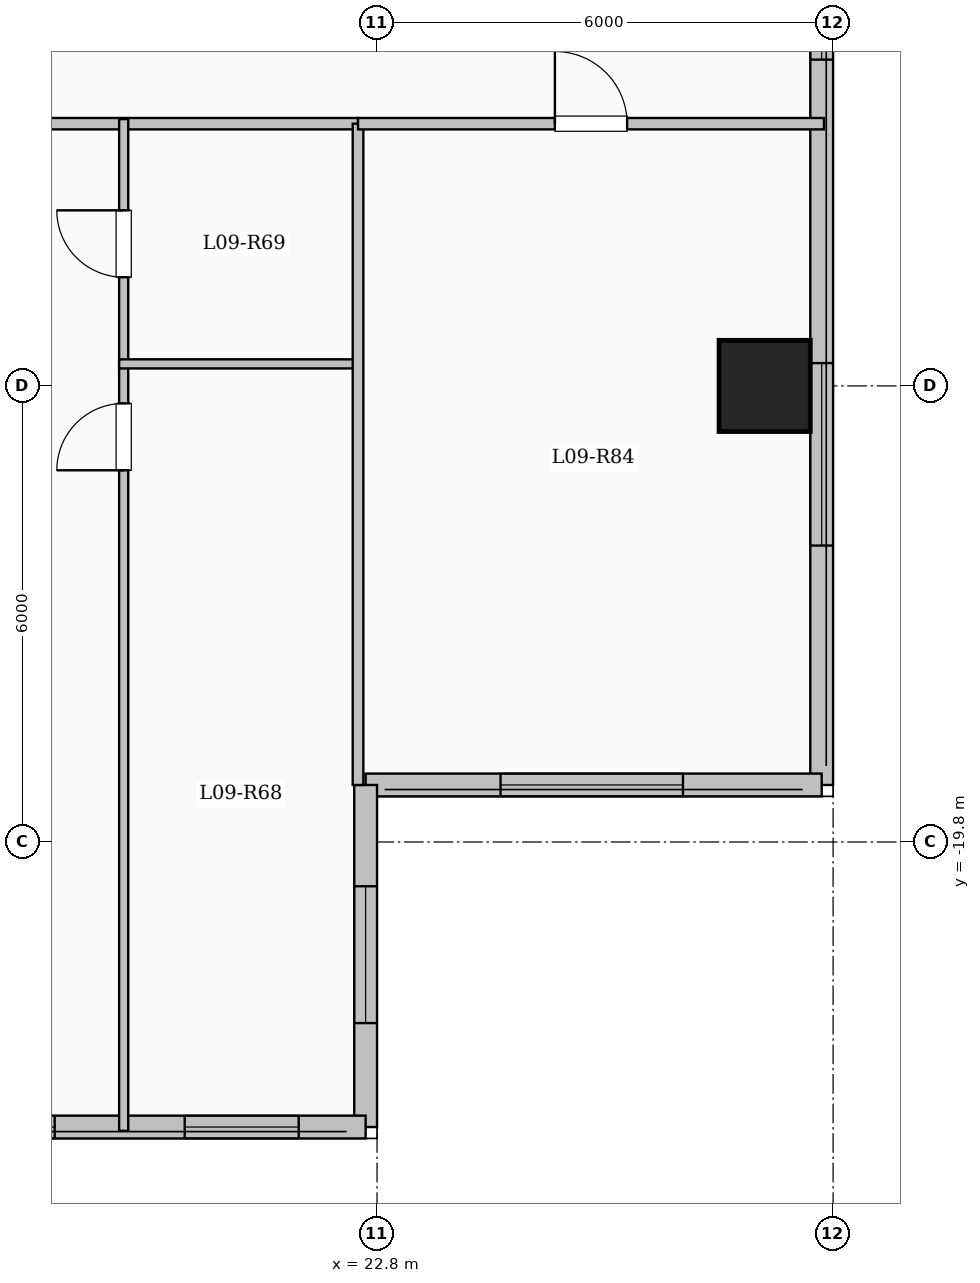
"""IFC4 building model, lengths in metres.
Left out: names, types, materials, properties, quantities, classifications, styles, units other than length and angle.
Written with IfcOpenShell. Run it as: python <this file> out.ifc"""

import sys

from ifc_helpers import new_model, si_unit, direction, frame, frame_2d, origin, origin_2d, place, context, subcontext, project, spatial, rectangle, extrude, element, fill, save


model = new_model("IFC4")
c1 = context("Model", 3, precision=1e-05, world=origin(), true_north=direction((0.0, 1.0)))
c2 = subcontext(c1, "Body", "Model", "MODEL_VIEW")
j1 = project(units=[si_unit("LENGTHUNIT", "METRE"), si_unit("PLANEANGLEUNIT", "RADIAN")], contexts=[c1])
p1 = place(None, origin())
s1 = spatial("IfcSite", under=j1, at=p1, CompositionType="ELEMENT")
p2 = place(p1, origin())
s2 = spatial("IfcBuilding", under=s1, at=p2, CompositionType="ELEMENT")
p3 = place(p2, frame((0.0, 0.0, 37.4)))
s3 = spatial("IfcBuildingStorey", under=s2, at=p3, CompositionType="ELEMENT", Elevation=37.4)
p4 = place(p3, frame((27.9, -13.8, 0.0), z_axis=(0.0, 0.0, 1.0), x_axis=(1.0, 0.0, 0.0)))
e1 = element("IfcColumn", 1, at=p4, inside=s3, PredefinedType="COLUMN", context=c2, shape_type="SweptSolid", body=[
    extrude(rectangle(XDim=1.2, YDim=1.2, at=origin_2d()), origin(), (0.0, 0.0, 1.0), 3.35),
])
p5 = place(p3, frame((28.65, 19.05, 0.0), z_axis=(0.0, 0.0, 1.0), x_axis=(0.0, -1.0, 0.0)))
e2 = element("IfcWall", 2, at=p5, inside=s3, PredefinedType="SOLIDWALL", context=c2, shape_type="SweptSolid", body=[
    extrude(rectangle(XDim=38.1, YDim=0.3, at=frame_2d((19.05, 0.0))), origin(), (0.0, 0.0, 1.0), 3.1),
])
p6 = place(p5, frame((2.275, 0.0, 0.9)))
e3 = element("IfcOpeningElement", 3, at=p6, cuts=e2, PredefinedType="OPENING", context=c2, shape_type="SweptSolid", body=[
    extrude(rectangle(XDim=2.0, YDim=1.7, at=frame_2d((1.0, 0.85))), frame((0.0, 0.16, 0.0), z_axis=(0.0, -1.0, 0.0), x_axis=(1.0, 0.0, 0.0)), (0.0, 0.0, 1.0), 0.32),
])
p7 = place(p5, frame((6.925, 0.0, 0.95)))
e4 = element("IfcOpeningElement", 4, at=p7, cuts=e2, PredefinedType="OPENING", context=c2, shape_type="SweptSolid", body=[
    extrude(rectangle(XDim=1.0, YDim=1.5, at=frame_2d((0.5, 0.75))), frame((0.0, 0.16, 0.0), z_axis=(0.0, -1.0, 0.0), x_axis=(1.0, 0.0, 0.0)), (0.0, 0.0, 1.0), 0.32),
])
p8 = place(p5, frame((16.3, 0.0, 0.9)))
e5 = element("IfcOpeningElement", 5, at=p8, cuts=e2, PredefinedType="OPENING", context=c2, shape_type="SweptSolid", body=[
    extrude(rectangle(XDim=2.0, YDim=1.7, at=frame_2d((1.0, 0.85))), frame((0.0, 0.16, 0.0), z_axis=(0.0, -1.0, 0.0), x_axis=(1.0, 0.0, 0.0)), (0.0, 0.0, 1.0), 0.32),
])
p9 = place(p5, frame((27.058, 0.0, 0.9)))
e6 = element("IfcOpeningElement", 6, at=p9, cuts=e2, PredefinedType="OPENING", context=c2, shape_type="SweptSolid", body=[
    extrude(rectangle(XDim=1.5, YDim=1.65, at=frame_2d((0.75, 0.825))), frame((0.0, 0.16, 0.0), z_axis=(0.0, -1.0, 0.0), x_axis=(1.0, 0.0, 0.0)), (0.0, 0.0, 1.0), 0.32),
])
p10 = place(p5, frame((32.55, 0.0, 0.9)))
e7 = element("IfcOpeningElement", 7, at=p10, cuts=e2, PredefinedType="OPENING", context=c2, shape_type="SweptSolid", body=[
    extrude(rectangle(XDim=2.4, YDim=1.8, at=frame_2d((1.2, 0.9))), frame((0.0, 0.16, 0.0), z_axis=(0.0, -1.0, 0.0), x_axis=(1.0, 0.0, 0.0)), (0.0, 0.0, 1.0), 0.32),
])
p11 = place(p3, frame((28.65, -19.05, 0.0), z_axis=(0.0, 0.0, 1.0), x_axis=(-1.0, 0.0, 0.0)))
e8 = element("IfcWall", 8, at=p11, inside=s3, PredefinedType="SOLIDWALL", context=c2, shape_type="SweptSolid", body=[
    extrude(rectangle(XDim=6.0, YDim=0.3, at=frame_2d((3.0, 0.0))), origin(), (0.0, 0.0, 1.0), 3.1),
])
p12 = place(p11, frame((1.825, 0.0, 0.9)))
e9 = element("IfcOpeningElement", 9, at=p12, cuts=e8, PredefinedType="OPENING", context=c2, shape_type="SweptSolid", body=[
    extrude(rectangle(XDim=2.4, YDim=1.8, at=frame_2d((1.2, 0.9))), frame((0.0, 0.16, 0.0), z_axis=(0.0, -1.0, 0.0), x_axis=(1.0, 0.0, 0.0)), (0.0, 0.0, 1.0), 0.32),
])
p13 = place(p3, frame((22.65, -19.05, 0.0), z_axis=(0.0, 0.0, 1.0), x_axis=(0.0, -1.0, 0.0)))
e10 = element("IfcWall", 10, at=p13, inside=s3, PredefinedType="SOLIDWALL", context=c2, shape_type="SweptSolid", body=[
    extrude(rectangle(XDim=4.5, YDim=0.3, at=frame_2d((2.25, 0.0))), origin(), (0.0, 0.0, 1.0), 3.1),
])
p14 = place(p13, frame((1.333, 0.0, 0.9)))
e11 = element("IfcOpeningElement", 11, at=p14, cuts=e10, PredefinedType="OPENING", context=c2, shape_type="SweptSolid", body=[
    extrude(rectangle(XDim=1.8, YDim=1.65, at=frame_2d((0.9, 0.825))), frame((0.0, 0.16, 0.0), z_axis=(0.0, -1.0, 0.0), x_axis=(1.0, 0.0, 0.0)), (0.0, 0.0, 1.0), 0.32),
])
p15 = place(p3, frame((22.65, -23.55, 0.0), z_axis=(0.0, 0.0, 1.0), x_axis=(-1.0, 0.0, 0.0)))
e12 = element("IfcWall", 12, at=p15, inside=s3, PredefinedType="SOLIDWALL", context=c2, shape_type="SweptSolid", body=[
    extrude(rectangle(XDim=15.3, YDim=0.3, at=frame_2d((7.65, 0.0))), origin(), (0.0, 0.0, 1.0), 3.1),
])
p16 = place(p15, frame((0.88, 0.0, 0.9)))
e13 = element("IfcOpeningElement", 13, at=p16, cuts=e12, PredefinedType="OPENING", context=c2, shape_type="SweptSolid", body=[
    extrude(rectangle(XDim=1.5, YDim=1.65, at=frame_2d((0.75, 0.825))), frame((0.0, 0.16, 0.0), z_axis=(0.0, -1.0, 0.0), x_axis=(1.0, 0.0, 0.0)), (0.0, 0.0, 1.0), 0.32),
])
p17 = place(p15, frame((4.091, 0.0, 0.9)))
e14 = element("IfcOpeningElement", 14, at=p17, cuts=e12, PredefinedType="OPENING", context=c2, shape_type="SweptSolid", body=[
    extrude(rectangle(XDim=1.5, YDim=1.65, at=frame_2d((0.75, 0.825))), frame((0.0, 0.16, 0.0), z_axis=(0.0, -1.0, 0.0), x_axis=(1.0, 0.0, 0.0)), (0.0, 0.0, 1.0), 0.32),
])
p18 = place(p15, frame((7.045, 0.0, 0.95)))
e15 = element("IfcOpeningElement", 15, at=p18, cuts=e12, PredefinedType="OPENING", context=c2, shape_type="SweptSolid", body=[
    extrude(rectangle(XDim=1.2, YDim=1.5, at=frame_2d((0.6, 0.75))), frame((0.0, 0.16, 0.0), z_axis=(0.0, -1.0, 0.0), x_axis=(1.0, 0.0, 0.0)), (0.0, 0.0, 1.0), 0.32),
])
p19 = place(p15, frame((9.212, 0.0, 0.95)))
e16 = element("IfcOpeningElement", 16, at=p19, cuts=e12, PredefinedType="OPENING", context=c2, shape_type="SweptSolid", body=[
    extrude(rectangle(XDim=1.2, YDim=1.5, at=frame_2d((0.6, 0.75))), frame((0.0, 0.16, 0.0), z_axis=(0.0, -1.0, 0.0), x_axis=(1.0, 0.0, 0.0)), (0.0, 0.0, 1.0), 0.32),
])
p20 = place(p15, frame((11.741, 0.0, 0.9)))
e17 = element("IfcOpeningElement", 17, at=p20, cuts=e12, PredefinedType="OPENING", context=c2, shape_type="SweptSolid", body=[
    extrude(rectangle(XDim=1.5, YDim=1.65, at=frame_2d((0.75, 0.825))), frame((0.0, 0.16, 0.0), z_axis=(0.0, -1.0, 0.0), x_axis=(1.0, 0.0, 0.0)), (0.0, 0.0, 1.0), 0.32),
])
p21 = place(p15, frame((14.303, 0.0, 0.95)))
e18 = element("IfcOpeningElement", 18, at=p21, cuts=e12, PredefinedType="OPENING", context=c2, shape_type="SweptSolid", body=[
    extrude(rectangle(XDim=0.85, YDim=1.5, at=frame_2d((0.425, 0.75))), frame((0.0, 0.16, 0.0), z_axis=(0.0, -1.0, 0.0), x_axis=(1.0, 0.0, 0.0)), (0.0, 0.0, 1.0), 0.32),
])
p22 = place(p3, frame((8.55, -10.35, 0.0), z_axis=(0.0, 0.0, 1.0), x_axis=(1.0, 0.0, 0.0)))
e19 = element("IfcWall", 19, at=p22, inside=s3, PredefinedType="PARTITIONING", context=c2, shape_type="SweptSolid", body=[
    extrude(rectangle(XDim=14.0, YDim=0.15, at=frame_2d((7.0, 0.0))), origin(), (0.0, 0.0, 1.0), 3.1),
])
p23 = place(p22, frame((0.75, 0.0, 0.0)))
e20 = element("IfcOpeningElement", 20, at=p23, cuts=e19, PredefinedType="OPENING", context=c2, shape_type="SweptSolid", body=[
    extrude(rectangle(XDim=0.96, YDim=2.15, at=frame_2d((0.48, 1.075))), frame((0.0, 0.085, 0.0), z_axis=(0.0, -1.0, 0.0), x_axis=(1.0, 0.0, 0.0)), (0.0, 0.0, 1.0), 0.17),
])
p24 = place(p22, frame((8.283, 0.0, 0.0)))
e21 = element("IfcOpeningElement", 21, at=p24, cuts=e19, PredefinedType="OPENING", context=c2, shape_type="SweptSolid", body=[
    extrude(rectangle(XDim=0.96, YDim=2.15, at=frame_2d((0.48, 1.075))), frame((0.0, 0.085, 0.0), z_axis=(0.0, -1.0, 0.0), x_axis=(1.0, 0.0, 0.0)), (0.0, 0.0, 1.0), 0.17),
])
p25 = place(p3, frame((19.467, -23.6, 0.0), z_axis=(0.0, 0.0, 1.0), x_axis=(0.0, 1.0, 0.0)))
e22 = element("IfcWall", 22, at=p25, inside=s3, PredefinedType="PARTITIONING", context=c2, shape_type="SweptSolid", body=[
    extrude(rectangle(XDim=10.09, YDim=0.12, at=frame_2d((5.045, 0.0))), origin(), (0.0, 0.0, 1.0), 3.1),
])
p26 = place(p25, frame((8.69, 0.0, 0.0)))
e23 = element("IfcOpeningElement", 23, at=p26, cuts=e22, PredefinedType="OPENING", context=c2, shape_type="SweptSolid", body=[
    extrude(rectangle(XDim=0.88, YDim=2.1, at=frame_2d((0.44, 1.05))), frame((0.0, 0.07, 0.0), z_axis=(0.0, -1.0, 0.0), x_axis=(1.0, 0.0, 0.0)), (0.0, 0.0, 1.0), 0.14),
])
p27 = place(p3, frame((19.467, -13.51, 0.0), z_axis=(0.0, 0.0, 1.0), x_axis=(0.0, 1.0, 0.0)))
e24 = element("IfcWall", 24, at=p27, inside=s3, PredefinedType="PARTITIONING", context=c2, shape_type="SweptSolid", body=[
    extrude(rectangle(XDim=3.22, YDim=0.12, at=frame_2d((1.61, 0.0))), origin(), (0.0, 0.0, 1.0), 3.1),
])
p28 = place(p27, frame((1.14, 0.0, 0.0)))
e25 = element("IfcOpeningElement", 25, at=p28, cuts=e24, PredefinedType="OPENING", context=c2, shape_type="SweptSolid", body=[
    extrude(rectangle(XDim=0.88, YDim=2.1, at=frame_2d((0.44, 1.05))), frame((0.0, 0.07, 0.0), z_axis=(0.0, -1.0, 0.0), x_axis=(1.0, 0.0, 0.0)), (0.0, 0.0, 1.0), 0.14),
])
p29 = place(p3, frame((19.407, -13.51, 0.0), z_axis=(0.0, 0.0, 1.0), x_axis=(1.0, 0.0, 0.0)))
e26 = element("IfcWall", 26, at=p29, inside=s3, PredefinedType="PARTITIONING", context=c2, shape_type="SweptSolid", body=[
    extrude(rectangle(XDim=3.203, YDim=0.12, at=frame_2d((1.602, 0.0))), origin(), (0.0, 0.0, 1.0), 3.1),
])
p30 = place(p3, frame((22.55, -19.05, 0.0), z_axis=(0.0, 0.0, 1.0), x_axis=(0.0, 1.0, 0.0)))
e27 = element("IfcWall", 27, at=p30, inside=s3, PredefinedType="PARTITIONING", context=c2, shape_type="SweptSolid", body=[
    extrude(rectangle(XDim=8.7, YDim=0.14, at=frame_2d((4.35, 0.0))), origin(), (0.0, 0.0, 1.0), 3.1),
])
p31 = place(p3, frame((22.55, -10.35, 0.0), z_axis=(0.0, 0.0, 1.0), x_axis=(1.0, 0.0, 0.0)))
e28 = element("IfcWall", 28, at=p31, inside=s3, PredefinedType="PARTITIONING", context=c2, shape_type="SweptSolid", body=[
    extrude(rectangle(XDim=6.13, YDim=0.15, at=frame_2d((3.065, 0.0))), origin(), (0.0, 0.0, 1.0), 3.1),
])
p32 = place(p31, frame((2.59, 0.0, 0.0)))
e29 = element("IfcOpeningElement", 29, at=p32, cuts=e28, PredefinedType="OPENING", context=c2, shape_type="SweptSolid", body=[
    extrude(rectangle(XDim=0.95, YDim=2.15, at=frame_2d((0.475, 1.075))), frame((0.0, 0.085, 0.0), z_axis=(0.0, -1.0, 0.0), x_axis=(1.0, 0.0, 0.0)), (0.0, 0.0, 1.0), 0.17),
])
p33 = place(p9, origin())
e30 = element("IfcWindow", 30, at=p33, inside=s3, PartitioningType="SINGLE_PANEL", PredefinedType="WINDOW", context=c2, shape_type="SweptSolid", body=[
    extrude(rectangle(XDim=1.5, YDim=1.65, at=frame_2d((0.75, 0.825))), frame((0.0, 0.03, 0.0), z_axis=(0.0, -1.0, 0.0), x_axis=(1.0, 0.0, 0.0)), (0.0, 0.0, 1.0), 0.06),
])
fill(e6, e30)
p34 = place(p10, origin())
e31 = element("IfcWindow", 31, at=p34, inside=s3, PartitioningType="SINGLE_PANEL", PredefinedType="WINDOW", context=c2, shape_type="SweptSolid", body=[
    extrude(rectangle(XDim=2.4, YDim=1.8, at=frame_2d((1.2, 0.9))), frame((0.0, 0.03, 0.0), z_axis=(0.0, -1.0, 0.0), x_axis=(1.0, 0.0, 0.0)), (0.0, 0.0, 1.0), 0.06),
])
fill(e7, e31)
p35 = place(p12, origin())
e32 = element("IfcWindow", 32, at=p35, inside=s3, PartitioningType="SINGLE_PANEL", PredefinedType="WINDOW", context=c2, shape_type="SweptSolid", body=[
    extrude(rectangle(XDim=2.4, YDim=1.8, at=frame_2d((1.2, 0.9))), frame((0.0, 0.03, 0.0), z_axis=(0.0, -1.0, 0.0), x_axis=(1.0, 0.0, 0.0)), (0.0, 0.0, 1.0), 0.06),
])
fill(e9, e32)
p36 = place(p14, origin())
e33 = element("IfcWindow", 33, at=p36, inside=s3, PartitioningType="SINGLE_PANEL", PredefinedType="WINDOW", context=c2, shape_type="SweptSolid", body=[
    extrude(rectangle(XDim=1.8, YDim=1.65, at=frame_2d((0.9, 0.825))), frame((0.0, 0.03, 0.0), z_axis=(0.0, -1.0, 0.0), x_axis=(1.0, 0.0, 0.0)), (0.0, 0.0, 1.0), 0.06),
])
fill(e11, e33)
p37 = place(p16, origin())
e34 = element("IfcWindow", 34, at=p37, inside=s3, PartitioningType="SINGLE_PANEL", PredefinedType="WINDOW", context=c2, shape_type="SweptSolid", body=[
    extrude(rectangle(XDim=1.5, YDim=1.65, at=frame_2d((0.75, 0.825))), frame((0.0, 0.03, 0.0), z_axis=(0.0, -1.0, 0.0), x_axis=(1.0, 0.0, 0.0)), (0.0, 0.0, 1.0), 0.06),
])
fill(e13, e34)
p38 = place(p17, origin())
e35 = element("IfcWindow", 35, at=p38, inside=s3, PartitioningType="SINGLE_PANEL", PredefinedType="WINDOW", context=c2, shape_type="SweptSolid", body=[
    extrude(rectangle(XDim=1.5, YDim=1.65, at=frame_2d((0.75, 0.825))), frame((0.0, 0.03, 0.0), z_axis=(0.0, -1.0, 0.0), x_axis=(1.0, 0.0, 0.0)), (0.0, 0.0, 1.0), 0.06),
])
fill(e14, e35)
p39 = place(p26, origin())
e36 = element("IfcDoor", 36, at=p39, inside=s3, OperationType="SINGLE_SWING_LEFT", PredefinedType="DOOR", context=c2, shape_type="SweptSolid", body=[
    extrude(rectangle(XDim=0.88, YDim=2.1, at=frame_2d((0.44, 1.05))), frame((0.0, 0.025, 0.0), z_axis=(0.0, -1.0, 0.0), x_axis=(1.0, 0.0, 0.0)), (0.0, 0.0, 1.0), 0.05),
])
fill(e23, e36)
p40 = place(p28, origin())
e37 = element("IfcDoor", 37, at=p40, inside=s3, OperationType="SINGLE_SWING_RIGHT", PredefinedType="DOOR", context=c2, shape_type="SweptSolid", body=[
    extrude(rectangle(XDim=0.88, YDim=2.1, at=frame_2d((0.44, 1.05))), frame((0.0, 0.025, 0.0), z_axis=(0.0, -1.0, 0.0), x_axis=(1.0, 0.0, 0.0)), (0.0, 0.0, 1.0), 0.05),
])
fill(e25, e37)
p41 = place(p32, origin())
e38 = element("IfcDoor", 38, at=p41, inside=s3, OperationType="SINGLE_SWING_LEFT", PredefinedType="DOOR", context=c2, shape_type="SweptSolid", body=[
    extrude(rectangle(XDim=0.95, YDim=2.15, at=frame_2d((0.475, 1.075))), frame((0.0, 0.025, 0.0), z_axis=(0.0, -1.0, 0.0), x_axis=(1.0, 0.0, 0.0)), (0.0, 0.0, 1.0), 0.05),
])
fill(e29, e38)
save(model, sys.argv[1])
